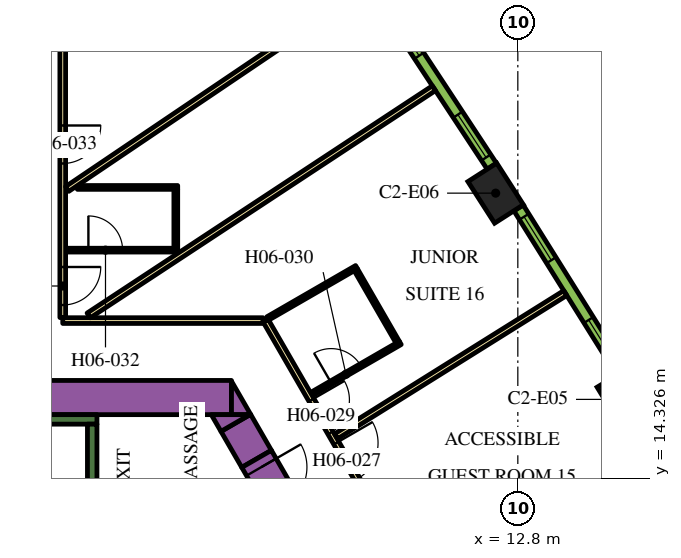
"""IFC4 building model, lengths in metres.
Left out: names, types, materials, properties, quantities, classifications, styles, units other than length and angle.
Written with IfcOpenShell. Run it as: python <this file> out.ifc"""

import sys

from ifc_helpers import new_model, si_unit, direction, frame, frame_2d, origin, origin_2d, place, context, subcontext, project, spatial, polyline, rectangle, outline, extrude, element, fill, save


model = new_model("IFC4")
c1 = context("Model", 3, precision=1e-05, world=origin(), true_north=direction((0.0, 1.0)))
c2 = subcontext(c1, "Body", "Model", "MODEL_VIEW")
j1 = project(units=[si_unit("LENGTHUNIT", "METRE"), si_unit("PLANEANGLEUNIT", "RADIAN")], contexts=[c1])
p1 = place(None, origin())
s1 = spatial("IfcSite", under=j1, at=p1, CompositionType="ELEMENT")
p2 = place(p1, origin())
s2 = spatial("IfcBuilding", under=s1, at=p2, CompositionType="ELEMENT")
p3 = place(p2, frame((0.0, 0.0, 91.5)))
s3 = spatial("IfcBuildingStorey", under=s2, at=p3, CompositionType="ELEMENT", Elevation=91.5)
for number, where, z_axis, x_axis in (
    (1, (15.609, 16.402, 0.0), (0.0, 0.0, 1.0), (-0.52, 0.854, 0.0)),
    (2, (12.217, 21.828, 0.0), (0.0, 0.0, 1.0), (-0.54, 0.842, 0.0)),
):
    element("IfcColumn", number, at=place(p3, frame(where, z_axis=z_axis, x_axis=x_axis)), inside=s3, PredefinedType="COLUMN", context=c2, shape_type="SweptSolid", body=[
        extrude(rectangle(XDim=1.3, YDim=0.9, at=origin_2d()), origin(), (0.0, 0.0, 1.0), 3.9),
    ])
p4 = place(p3, frame((-4.224, 16.45, 0.0), z_axis=(0.0, 0.0, 1.0), x_axis=(1.0, 0.0, 0.0)))
e3 = element("IfcWall", 3, at=p4, inside=s3, PredefinedType="SOLIDWALL", context=c2, shape_type="SweptSolid", body=[
    extrude(rectangle(XDim=9.488, YDim=0.9, at=frame_2d((4.744, 0.0))), origin(), (0.0, 0.0, 1.0), 3.9),
])
p5 = place(p3, origin())
e4 = element("IfcWall", 4, at=p5, inside=s3, PredefinedType="SOLIDWALL", context=c2, shape_type="SweptSolid", body=[
    extrude(outline(polyline([(5.265, 16.0), (5.265, 16.88), (5.773, 16.0), (5.265, 16.0)])), origin(), (0.0, 0.0, 1.0), 3.9),
])
p6 = place(p3, frame((5.926, 14.836, 0.0), z_axis=(0.0, 0.0, 1.0), x_axis=(-0.500076735116, 0.865981096212, 0.0)))
e5 = element("IfcWall", 5, at=p6, inside=s3, PredefinedType="SOLIDWALL", context=c2, shape_type="SweptSolid", body=[
    extrude(rectangle(XDim=1.094, YDim=0.9, at=frame_2d((0.547, 0.0))), origin(), (0.0, 0.0, 1.0), 3.9),
])
e6 = element("IfcWall", 6, at=p5, inside=s3, PredefinedType="SOLIDWALL", context=c2, shape_type="SweptSolid", body=[
    extrude(outline(polyline([(4.734, 16.0), (5.75, 16.0), (4.988, 15.56), (4.734, 16.0)])), origin(), (0.0, 0.0, 1.0), 3.9),
])
p7 = place(p3, frame((-1.725, 15.875, 0.0), z_axis=(0.0, 0.0, 1.0), x_axis=(1.0, 0.0, 0.0)))
e7 = element("IfcWall", 7, at=p7, inside=s3, PredefinedType="SOLIDWALL", context=c2, shape_type="SweptSolid", body=[
    extrude(rectangle(XDim=3.45, YDim=0.25, at=frame_2d((1.725, 0.0))), origin(), (0.0, 0.0, 1.0), 3.9),
])
p8 = place(p3, frame((1.6, 8.95, 0.0), z_axis=(0.0, 0.0, 1.0), x_axis=(0.0, 1.0, 0.0)))
e8 = element("IfcWall", 8, at=p8, inside=s3, PredefinedType="SOLIDWALL", context=c2, shape_type="SweptSolid", body=[
    extrude(rectangle(XDim=6.8, YDim=0.25, at=frame_2d((3.4, 0.0))), origin(), (0.0, 0.0, 1.0), 3.9),
])
p9 = place(p3, frame((5.926, 14.836, 0.0), z_axis=(0.0, 0.0, 1.0), x_axis=(0.500062241894, -0.865989465428, 0.0)))
e9 = element("IfcWall", 9, at=p9, inside=s3, PredefinedType="SOLIDWALL", context=c2, shape_type="SweptSolid", body=[
    extrude(rectangle(XDim=1.7, YDim=0.9, at=frame_2d((0.85, 0.0))), origin(), (0.0, 0.0, 1.0), 3.9),
])
p10 = place(p9, frame((0.25, 0.0, 0.0)))
e10 = element("IfcOpeningElement", 10, at=p10, cuts=e9, PredefinedType="OPENING", context=c2, shape_type="SweptSolid", body=[
    extrude(rectangle(XDim=1.2, YDim=2.1, at=frame_2d((0.6, 1.05))), frame((0.0, 0.46, 0.0), z_axis=(0.0, -1.0, 0.0), x_axis=(1.0, 0.0, 0.0)), (0.0, 0.0, 1.0), 0.92),
])
p11 = place(p3, frame((6.163, 18.475, 0.0), z_axis=(0.0, 0.0, 1.0), x_axis=(0.500001317485, -0.866024643133, 0.0)))
e11 = element("IfcWall", 11, at=p11, inside=s3, PredefinedType="PARTITIONING", context=c2, shape_type="SweptSolid", body=[
    extrude(rectangle(XDim=25.767, YDim=0.15, at=frame_2d((12.883, 0.0))), origin(), (0.0, 0.0, 1.0), 2.75),
])
p12 = place(p11, frame((24.241, 0.0, 0.0)))
e12 = element("IfcOpeningElement", 12, at=p12, cuts=e11, PredefinedType="OPENING", context=c2, shape_type="SweptSolid", body=[
    extrude(rectangle(XDim=1.0, YDim=2.1, at=frame_2d((0.5, 1.05))), frame((0.0, 0.085, 0.0), z_axis=(0.0, -1.0, 0.0), x_axis=(1.0, 0.0, 0.0)), (0.0, 0.0, 1.0), 0.17),
])
p13 = place(p11, frame((13.144, 0.0, 0.0)))
e13 = element("IfcOpeningElement", 13, at=p13, cuts=e11, PredefinedType="OPENING", context=c2, shape_type="SweptSolid", body=[
    extrude(rectangle(XDim=1.0, YDim=2.1, at=frame_2d((0.5, 1.05))), frame((0.0, 0.085, 0.0), z_axis=(0.0, -1.0, 0.0), x_axis=(1.0, 0.0, 0.0)), (0.0, 0.0, 1.0), 0.17),
])
p14 = place(p11, frame((10.874, 0.0, 0.0)))
e14 = element("IfcOpeningElement", 14, at=p14, cuts=e11, PredefinedType="OPENING", context=c2, shape_type="SweptSolid", body=[
    extrude(rectangle(XDim=0.9, YDim=2.1, at=frame_2d((0.45, 1.05))), frame((0.0, 0.085, 0.0), z_axis=(0.0, -1.0, 0.0), x_axis=(1.0, 0.0, 0.0)), (0.0, 0.0, 1.0), 0.17),
])
p15 = place(p11, frame((3.718, 0.0, 0.0)))
e15 = element("IfcOpeningElement", 15, at=p15, cuts=e11, PredefinedType="OPENING", context=c2, shape_type="SweptSolid", body=[
    extrude(rectangle(XDim=1.1, YDim=2.1, at=frame_2d((0.55, 1.05))), frame((0.0, 0.085, 0.0), z_axis=(0.0, -1.0, 0.0), x_axis=(1.0, 0.0, 0.0)), (0.0, 0.0, 1.0), 0.17),
])
p16 = place(p11, frame((2.411, 0.0, 0.0)))
e16 = element("IfcOpeningElement", 16, at=p16, cuts=e11, PredefinedType="OPENING", context=c2, shape_type="SweptSolid", body=[
    extrude(rectangle(XDim=1.0, YDim=2.1, at=frame_2d((0.5, 1.05))), frame((0.0, 0.085, 0.0), z_axis=(0.0, -1.0, 0.0), x_axis=(1.0, 0.0, 0.0)), (0.0, 0.0, 1.0), 0.17),
])
p17 = place(p3, frame((0.825, 18.475, 0.0), z_axis=(0.0, 0.0, 1.0), x_axis=(1.0, 0.0, 0.0)))
e17 = element("IfcWall", 17, at=p17, inside=s3, PredefinedType="PARTITIONING", context=c2, shape_type="SweptSolid", body=[
    extrude(rectangle(XDim=5.268, YDim=0.15, at=frame_2d((2.634, 0.0))), origin(), (0.0, 0.0, 1.0), 2.75),
])
p18 = place(p3, frame((0.825, 32.098, 0.0), z_axis=(0.0, 0.0, 1.0), x_axis=(0.0, -1.0, 0.0)))
e18 = element("IfcWall", 18, at=p18, inside=s3, PredefinedType="PARTITIONING", context=c2, shape_type="SweptSolid", body=[
    extrude(rectangle(XDim=13.543, YDim=0.15, at=frame_2d((6.772, 0.0))), origin(), (0.0, 0.0, 1.0), 2.75),
])
p19 = place(p18, frame((12.213, 0.0, 0.0)))
e19 = element("IfcOpeningElement", 19, at=p19, cuts=e18, PredefinedType="OPENING", context=c2, shape_type="SweptSolid", body=[
    extrude(rectangle(XDim=1.0, YDim=2.1, at=frame_2d((0.5, 1.05))), frame((0.0, 0.085, 0.0), z_axis=(0.0, -1.0, 0.0), x_axis=(1.0, 0.0, 0.0)), (0.0, 0.0, 1.0), 0.17),
])
p20 = place(p18, frame((8.49, 0.0, 0.0)))
e20 = element("IfcOpeningElement", 20, at=p20, cuts=e18, PredefinedType="OPENING", context=c2, shape_type="SweptSolid", body=[
    extrude(rectangle(XDim=1.0, YDim=2.1, at=frame_2d((0.5, 1.05))), frame((0.0, 0.085, 0.0), z_axis=(0.0, -1.0, 0.0), x_axis=(1.0, 0.0, 0.0)), (0.0, 0.0, 1.0), 0.17),
])
p21 = place(p3, frame((8.326, 26.923, 0.0), z_axis=(0.0, 0.0, 1.0), x_axis=(-0.828836601893, -0.5594907393, 0.0)))
e21 = element("IfcWall", 21, at=p21, inside=s3, PredefinedType="PARTITIONING", context=c2, shape_type="SweptSolid", body=[
    extrude(rectangle(XDim=8.909, YDim=0.15, at=frame_2d((4.455, 0.0))), origin(), (0.0, 0.0, 1.0), 2.75),
])
p22 = place(p3, frame((10.592, 24.589, 0.0), z_axis=(0.0, 0.0, 1.0), x_axis=(-0.835337323748, -0.549737715236, 0.0)))
e22 = element("IfcWall", 22, at=p22, inside=s3, PredefinedType="PARTITIONING", context=c2, shape_type="SweptSolid", body=[
    extrude(rectangle(XDim=10.875, YDim=0.15, at=frame_2d((5.438, 0.0))), origin(), (0.0, 0.0, 1.0), 2.75),
])
p23 = place(p3, frame((14.049, 19.2, 0.0), z_axis=(0.0, 0.0, 1.0), x_axis=(-0.847955867271, -0.530066832731, 0.0)))
e23 = element("IfcWall", 23, at=p23, inside=s3, PredefinedType="PARTITIONING", context=c2, shape_type="SweptSolid", body=[
    extrude(rectangle(XDim=7.111, YDim=0.15, at=frame_2d((3.556, 0.0))), origin(), (0.0, 0.0, 1.0), 2.75),
])
p24 = place(p3, frame((7.368, 16.538, 0.0), z_axis=(0.0, 0.0, 1.0), x_axis=(0.866036505625, 0.499980770555, 0.0)))
e24 = element("IfcWall", 24, at=p24, inside=s3, PredefinedType="PARTITIONING", context=c2, shape_type="SweptSolid", body=[
    extrude(rectangle(XDim=2.7, YDim=0.1, at=frame_2d((1.35, 0.0))), origin(), (0.0, 0.0, 1.0), 2.75),
])
p25 = place(p24, frame((0.6, 0.0, 0.0)))
e25 = element("IfcOpeningElement", 25, at=p25, cuts=e24, PredefinedType="OPENING", context=c2, shape_type="SweptSolid", body=[
    extrude(rectangle(XDim=0.9, YDim=2.1, at=frame_2d((0.45, 1.05))), frame((0.0, 0.06, 0.0), z_axis=(0.0, -1.0, 0.0), x_axis=(1.0, 0.0, 0.0)), (0.0, 0.0, 1.0), 0.12),
])
p26 = place(p3, frame((9.638, 17.906, 0.0), z_axis=(0.0, 0.0, 1.0), x_axis=(-0.50002983664, 0.866008176907, 0.0)))
e26 = element("IfcWall", 26, at=p26, inside=s3, PredefinedType="PARTITIONING", context=c2, shape_type="SweptSolid", body=[
    extrude(rectangle(XDim=2.2, YDim=0.1, at=frame_2d((1.1, 0.0))), origin(), (0.0, 0.0, 1.0), 2.75),
])
p27 = place(p3, frame((6.218, 18.53, 0.0), z_axis=(0.0, 0.0, 1.0), x_axis=(0.86599734893, 0.500048589285, 0.0)))
e27 = element("IfcWall", 27, at=p27, inside=s3, PredefinedType="PARTITIONING", context=c2, shape_type="SweptSolid", body=[
    extrude(rectangle(XDim=2.7, YDim=0.1, at=frame_2d((1.35, 0.0))), origin(), (0.0, 0.0, 1.0), 2.75),
])
p28 = place(p3, frame((0.9, 20.329, 0.0), z_axis=(0.0, 0.0, 1.0), x_axis=(1.0, 0.0, 0.0)))
e28 = element("IfcWall", 28, at=p28, inside=s3, PredefinedType="PARTITIONING", context=c2, shape_type="SweptSolid", body=[
    extrude(rectangle(XDim=2.95, YDim=0.1, at=frame_2d((1.475, 0.0))), origin(), (0.0, 0.0, 1.0), 2.75),
])
p29 = place(p28, frame((0.6, 0.0, 0.0)))
e29 = element("IfcOpeningElement", 29, at=p29, cuts=e28, PredefinedType="OPENING", context=c2, shape_type="SweptSolid", body=[
    extrude(rectangle(XDim=0.9, YDim=2.1, at=frame_2d((0.45, 1.05))), frame((0.0, 0.06, 0.0), z_axis=(0.0, -1.0, 0.0), x_axis=(1.0, 0.0, 0.0)), (0.0, 0.0, 1.0), 0.12),
])
p30 = place(p3, frame((3.8, 20.378, 0.0), z_axis=(0.0, 0.0, 1.0), x_axis=(0.0, 1.0, 0.0)))
e30 = element("IfcWall", 30, at=p30, inside=s3, PredefinedType="PARTITIONING", context=c2, shape_type="SweptSolid", body=[
    extrude(rectangle(XDim=1.55, YDim=0.1, at=frame_2d((0.775, 0.0))), origin(), (0.0, 0.0, 1.0), 2.75),
])
p31 = place(p3, frame((1.21, 21.979, 0.0), z_axis=(0.0, 0.0, 1.0), x_axis=(1.0, 0.0, 0.0)))
e31 = element("IfcWall", 31, at=p31, inside=s3, PredefinedType="PARTITIONING", context=c2, shape_type="SweptSolid", body=[
    extrude(rectangle(XDim=2.64, YDim=0.1, at=frame_2d((1.32, 0.0))), origin(), (0.0, 0.0, 1.0), 2.75),
])
p32 = place(p3, frame((15.524, 17.114, 0.0), z_axis=(0.0, 0.0, 1.0), x_axis=(-0.530072082134, 0.847952585787, 0.0)))
e32 = element("IfcWall", 32, at=p32, inside=s3, PredefinedType="SOLIDWALL", context=c2, shape_type="SweptSolid", body=[
    extrude(rectangle(XDim=5.1, YDim=0.29, at=frame_2d((2.55, 0.0))), origin(), (0.0, 0.0, 1.0), 3.65),
])
p33 = place(p32, frame((0.273, 0.0, 0.9)))
e33 = element("IfcOpeningElement", 33, at=p33, cuts=e32, PredefinedType="OPENING", context=c2, shape_type="SweptSolid", body=[
    extrude(rectangle(XDim=1.35, YDim=2.15, at=frame_2d((0.675, 1.075))), frame((0.0, 0.155, 0.0), z_axis=(0.0, -1.0, 0.0), x_axis=(1.0, 0.0, 0.0)), (0.0, 0.0, 1.0), 0.31),
])
p34 = place(p32, frame((3.478, 0.0, 0.9)))
e34 = element("IfcOpeningElement", 34, at=p34, cuts=e32, PredefinedType="OPENING", context=c2, shape_type="SweptSolid", body=[
    extrude(rectangle(XDim=1.35, YDim=2.15, at=frame_2d((0.675, 1.075))), frame((0.0, 0.155, 0.0), z_axis=(0.0, -1.0, 0.0), x_axis=(1.0, 0.0, 0.0)), (0.0, 0.0, 1.0), 0.31),
])
p35 = place(p3, frame((12.115, 22.539, 0.0), z_axis=(0.0, 0.0, 1.0), x_axis=(-0.549741341923, 0.835334937005, 0.0)))
e35 = element("IfcWall", 35, at=p35, inside=s3, PredefinedType="SOLIDWALL", context=c2, shape_type="SweptSolid", body=[
    extrude(rectangle(XDim=5.1, YDim=0.29, at=frame_2d((2.55, 0.0))), origin(), (0.0, 0.0, 1.0), 3.65),
])
p36 = place(p35, frame((0.273, 0.0, 0.9)))
e36 = element("IfcOpeningElement", 36, at=p36, cuts=e35, PredefinedType="OPENING", context=c2, shape_type="SweptSolid", body=[
    extrude(rectangle(XDim=1.35, YDim=2.15, at=frame_2d((0.675, 1.075))), frame((0.0, 0.155, 0.0), z_axis=(0.0, -1.0, 0.0), x_axis=(1.0, 0.0, 0.0)), (0.0, 0.0, 1.0), 0.31),
])
p37 = place(p35, frame((3.478, 0.0, 0.9)))
e37 = element("IfcOpeningElement", 37, at=p37, cuts=e35, PredefinedType="OPENING", context=c2, shape_type="SweptSolid", body=[
    extrude(rectangle(XDim=1.35, YDim=2.15, at=frame_2d((0.675, 1.075))), frame((0.0, 0.155, 0.0), z_axis=(0.0, -1.0, 0.0), x_axis=(1.0, 0.0, 0.0)), (0.0, 0.0, 1.0), 0.31),
])
p38 = place(p10, origin())
e38 = element("IfcDoor", 38, at=p38, inside=s3, OperationType="SINGLE_SWING_LEFT", PredefinedType="DOOR", context=c2, shape_type="SweptSolid", body=[
    extrude(rectangle(XDim=1.2, YDim=2.1, at=frame_2d((0.6, 1.05))), frame((0.0, 0.025, 0.0), z_axis=(0.0, -1.0, 0.0), x_axis=(1.0, 0.0, 0.0)), (0.0, 0.0, 1.0), 0.05),
])
fill(e10, e38)
p39 = place(p15, origin())
e39 = element("IfcDoor", 39, at=p39, inside=s3, OperationType="SINGLE_SWING_LEFT", PredefinedType="DOOR", context=c2, shape_type="SweptSolid", body=[
    extrude(rectangle(XDim=1.1, YDim=2.1, at=frame_2d((0.55, 1.05))), frame((0.0, 0.025, 0.0), z_axis=(0.0, -1.0, 0.0), x_axis=(1.0, 0.0, 0.0)), (0.0, 0.0, 1.0), 0.05),
])
fill(e15, e39)
p40 = place(p16, origin())
e40 = element("IfcDoor", 40, at=p40, inside=s3, OperationType="SINGLE_SWING_RIGHT", PredefinedType="DOOR", context=c2, shape_type="SweptSolid", body=[
    extrude(rectangle(XDim=1.0, YDim=2.1, at=frame_2d((0.5, 1.05))), frame((0.0, 0.025, 0.0), z_axis=(0.0, -1.0, 0.0), x_axis=(1.0, 0.0, 0.0)), (0.0, 0.0, 1.0), 0.05),
])
fill(e16, e40)
p41 = place(p25, origin())
e41 = element("IfcDoor", 41, at=p41, inside=s3, OperationType="SINGLE_SWING_LEFT", PredefinedType="DOOR", context=c2, shape_type="SweptSolid", body=[
    extrude(rectangle(XDim=0.9, YDim=2.1, at=frame_2d((0.45, 1.05))), frame((0.0, 0.025, 0.0), z_axis=(0.0, -1.0, 0.0), x_axis=(1.0, 0.0, 0.0)), (0.0, 0.0, 1.0), 0.05),
])
fill(e25, e41)
p42 = place(p19, origin())
e42 = element("IfcDoor", 42, at=p42, inside=s3, OperationType="SINGLE_SWING_RIGHT", PredefinedType="DOOR", context=c2, shape_type="SweptSolid", body=[
    extrude(rectangle(XDim=1.0, YDim=2.1, at=frame_2d((0.5, 1.05))), frame((0.0, 0.025, 0.0), z_axis=(0.0, -1.0, 0.0), x_axis=(1.0, 0.0, 0.0)), (0.0, 0.0, 1.0), 0.05),
])
fill(e19, e42)
p43 = place(p29, origin())
e43 = element("IfcDoor", 43, at=p43, inside=s3, OperationType="SINGLE_SWING_LEFT", PredefinedType="DOOR", context=c2, shape_type="SweptSolid", body=[
    extrude(rectangle(XDim=0.9, YDim=2.1, at=frame_2d((0.45, 1.05))), frame((0.0, 0.025, 0.0), z_axis=(0.0, -1.0, 0.0), x_axis=(1.0, 0.0, 0.0)), (0.0, 0.0, 1.0), 0.05),
])
fill(e29, e43)
p44 = place(p20, origin())
e44 = element("IfcDoor", 44, at=p44, inside=s3, OperationType="SINGLE_SWING_RIGHT", PredefinedType="DOOR", context=c2, shape_type="SweptSolid", body=[
    extrude(rectangle(XDim=1.0, YDim=2.1, at=frame_2d((0.5, 1.05))), frame((0.0, 0.025, 0.0), z_axis=(0.0, -1.0, 0.0), x_axis=(1.0, 0.0, 0.0)), (0.0, 0.0, 1.0), 0.05),
])
fill(e20, e44)
p45 = place(p33, origin())
e45 = element("IfcWindow", 45, at=p45, inside=s3, PartitioningType="DOUBLE_PANEL_VERTICAL", PredefinedType="WINDOW", context=c2, shape_type="SweptSolid", body=[
    extrude(rectangle(XDim=1.35, YDim=2.15, at=frame_2d((0.675, 1.075))), frame((0.0, 0.015, 0.0), z_axis=(0.0, -1.0, 0.0), x_axis=(1.0, 0.0, 0.0)), (0.0, 0.0, 1.0), 0.06),
])
fill(e33, e45)
p46 = place(p34, origin())
e46 = element("IfcWindow", 46, at=p46, inside=s3, PartitioningType="DOUBLE_PANEL_VERTICAL", PredefinedType="WINDOW", context=c2, shape_type="SweptSolid", body=[
    extrude(rectangle(XDim=1.35, YDim=2.15, at=frame_2d((0.675, 1.075))), frame((0.0, 0.015, 0.0), z_axis=(0.0, -1.0, 0.0), x_axis=(1.0, 0.0, 0.0)), (0.0, 0.0, 1.0), 0.06),
])
fill(e34, e46)
p47 = place(p36, origin())
e47 = element("IfcWindow", 47, at=p47, inside=s3, PartitioningType="DOUBLE_PANEL_VERTICAL", PredefinedType="WINDOW", context=c2, shape_type="SweptSolid", body=[
    extrude(rectangle(XDim=1.35, YDim=2.15, at=frame_2d((0.675, 1.075))), frame((0.0, 0.015, 0.0), z_axis=(0.0, -1.0, 0.0), x_axis=(1.0, 0.0, 0.0)), (0.0, 0.0, 1.0), 0.06),
])
fill(e36, e47)
p48 = place(p37, origin())
e48 = element("IfcWindow", 48, at=p48, inside=s3, PartitioningType="DOUBLE_PANEL_VERTICAL", PredefinedType="WINDOW", context=c2, shape_type="SweptSolid", body=[
    extrude(rectangle(XDim=1.35, YDim=2.15, at=frame_2d((0.675, 1.075))), frame((0.0, 0.015, 0.0), z_axis=(0.0, -1.0, 0.0), x_axis=(1.0, 0.0, 0.0)), (0.0, 0.0, 1.0), 0.06),
])
fill(e37, e48)
save(model, sys.argv[1])
